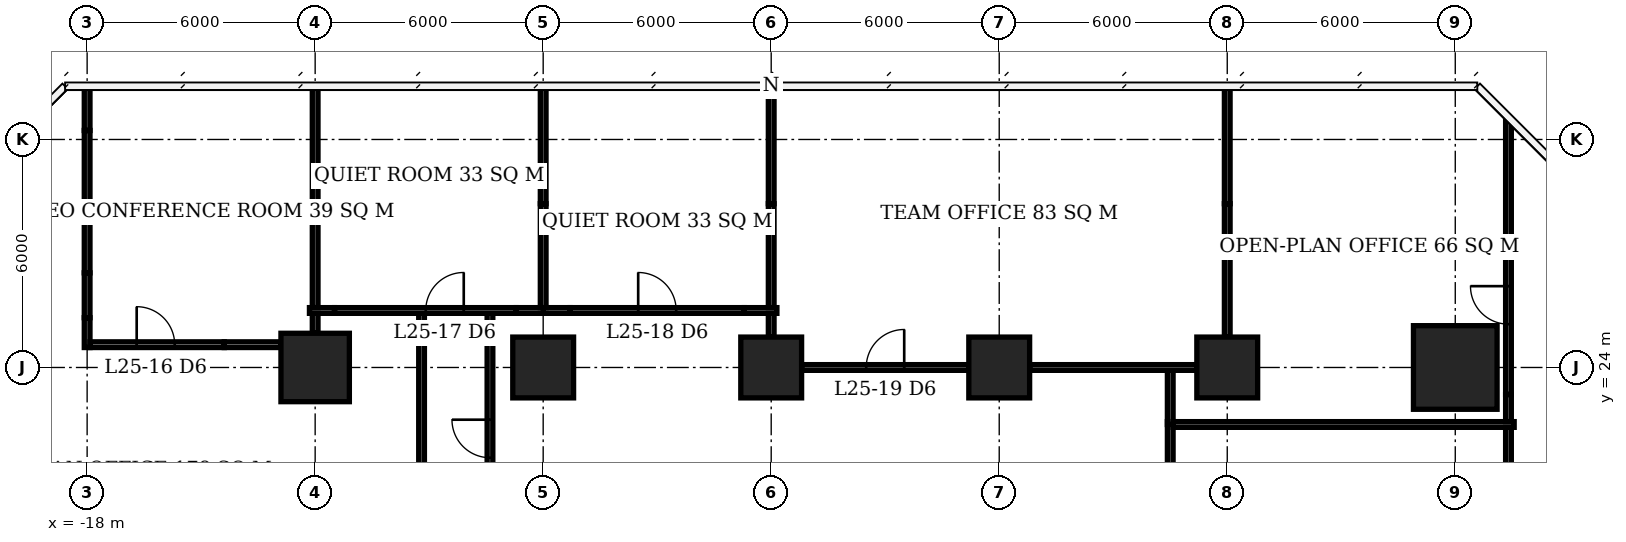
"""IFC4 building model, lengths in metres.
Left out: names, types, materials, properties, quantities, classifications, styles, units other than length and angle.
Written with IfcOpenShell. Run it as: python <this file> out.ifc"""

import sys

from ifc_helpers import new_model, si_unit, direction, frame, frame_2d, origin, origin_2d, place, context, subcontext, project, spatial, rectangle, extrude, element, fill, save


model = new_model("IFC4")
c1 = context("Model", 3, precision=1e-05, world=origin(), true_north=direction((0.0, 1.0)))
c2 = subcontext(c1, "Body", "Model", "MODEL_VIEW")
j1 = project(units=[si_unit("LENGTHUNIT", "METRE"), si_unit("PLANEANGLEUNIT", "RADIAN")], contexts=[c1])
p1 = place(None, origin())
s1 = spatial("IfcSite", under=j1, at=p1, CompositionType="ELEMENT")
p2 = place(p1, origin())
s2 = spatial("IfcBuilding", under=s1, at=p2, CompositionType="ELEMENT")
p3 = place(p2, frame((0.0, 0.0, 105.5)))
s3 = spatial("IfcBuildingStorey", under=s2, at=p3, CompositionType="ELEMENT", Elevation=105.5)
p4 = place(p3, frame((-12.0, 24.0, 0.0), z_axis=(0.0, 0.0, 1.0), x_axis=(1.0, 0.0, 0.0)))
e1 = element("IfcColumn", 1, at=p4, inside=s3, PredefinedType="COLUMN", context=c2, shape_type="SweptSolid", body=[
    extrude(rectangle(XDim=1.8, YDim=1.8, at=origin_2d()), origin(), (0.0, 0.0, 1.0), 3.9),
])
for number, where, z_axis, x_axis in (
    (2, (-6.0, 24.0, 0.0), (0.0, 0.0, 1.0), (1.0, 0.0, 0.0)),
    (3, (0.0, 24.0, 0.0), (0.0, 0.0, 1.0), (1.0, 0.0, 0.0)),
    (4, (6.0, 24.0, 0.0), (0.0, 0.0, 1.0), (1.0, 0.0, 0.0)),
    (5, (12.0, 24.0, 0.0), (0.0, 0.0, 1.0), (1.0, 0.0, 0.0)),
):
    element("IfcColumn", number, at=place(p3, frame(where, z_axis=z_axis, x_axis=x_axis)), inside=s3, PredefinedType="COLUMN", context=c2, shape_type="SweptSolid", body=[
        extrude(rectangle(XDim=1.6, YDim=1.6, at=origin_2d()), origin(), (0.0, 0.0, 1.0), 3.9),
    ])
p5 = place(p3, frame((18.0, 24.0, 0.0), z_axis=(0.0, 0.0, 1.0), x_axis=(1.0, 0.0, 0.0)))
e6 = element("IfcColumn", 6, at=p5, inside=s3, PredefinedType="COLUMN", context=c2, shape_type="SweptSolid", body=[
    extrude(rectangle(XDim=2.2, YDim=2.2, at=origin_2d()), origin(), (0.0, 0.0, 1.0), 3.9),
])
p6 = place(p3, frame((0.8, 24.0, 0.0), z_axis=(0.0, 0.0, 1.0), x_axis=(1.0, 0.0, 0.0)))
e7 = element("IfcWall", 7, at=p6, inside=s3, PredefinedType="PARTITIONING", context=c2, shape_type="SweptSolid", body=[
    extrude(rectangle(XDim=4.4, YDim=0.15, at=frame_2d((2.2, 0.0))), origin(), (0.0, 0.0, 1.0), 3.65),
])
p7 = place(p6, frame((1.7, 0.0, 0.0)))
e8 = element("IfcOpeningElement", 8, at=p7, cuts=e7, PredefinedType="OPENING", context=c2, shape_type="SweptSolid", body=[
    extrude(rectangle(XDim=1.0, YDim=2.1, at=frame_2d((0.5, 1.05))), frame((0.0, 0.085, 0.0), z_axis=(0.0, -1.0, 0.0), x_axis=(1.0, 0.0, 0.0)), (0.0, 0.0, 1.0), 0.17),
])
p8 = place(p3, frame((6.8, 24.0, 0.0), z_axis=(0.0, 0.0, 1.0), x_axis=(1.0, 0.0, 0.0)))
e9 = element("IfcWall", 9, at=p8, inside=s3, PredefinedType="PARTITIONING", context=c2, shape_type="SweptSolid", body=[
    extrude(rectangle(XDim=4.4, YDim=0.15, at=frame_2d((2.2, 0.0))), origin(), (0.0, 0.0, 1.0), 3.65),
])
p9 = place(p3, frame((-17.925, 24.6, 0.0), z_axis=(0.0, 0.0, 1.0), x_axis=(1.0, 0.0, 0.0)))
e10 = element("IfcWall", 10, at=p9, inside=s3, PredefinedType="PARTITIONING", context=c2, shape_type="SweptSolid", body=[
    extrude(rectangle(XDim=3.533, YDim=0.15, at=frame_2d((1.767, 0.0))), origin(), (0.0, 0.0, 1.0), 3.65),
])
p10 = place(p9, frame((1.229, 0.0, 0.0)))
e11 = element("IfcOpeningElement", 11, at=p10, cuts=e10, PredefinedType="OPENING", context=c2, shape_type="SweptSolid", body=[
    extrude(rectangle(XDim=1.0, YDim=2.1, at=frame_2d((0.5, 1.05))), frame((0.0, 0.085, 0.0), z_axis=(0.0, -1.0, 0.0), x_axis=(1.0, 0.0, 0.0)), (0.0, 0.0, 1.0), 0.17),
])
p11 = place(p3, frame((-14.392, 24.6, 0.0), z_axis=(0.0, 0.0, 1.0), x_axis=(1.0, 0.0, 0.0)))
e12 = element("IfcWall", 12, at=p11, inside=s3, PredefinedType="PARTITIONING", context=c2, shape_type="SweptSolid", body=[
    extrude(rectangle(XDim=1.492, YDim=0.15, at=frame_2d((0.746, 0.0))), origin(), (0.0, 0.0, 1.0), 2.65),
])
p12 = place(p3, frame((-12.15, 25.5, 0.0), z_axis=(0.0, 0.0, 1.0), x_axis=(1.0, 0.0, 0.0)))
e13 = element("IfcWall", 13, at=p12, inside=s3, PredefinedType="PARTITIONING", context=c2, shape_type="SweptSolid", body=[
    extrude(rectangle(XDim=0.66, YDim=0.15, at=frame_2d((0.33, 0.0))), origin(), (0.0, 0.0, 1.0), 2.65),
])
p13 = place(p3, frame((-11.49, 25.5, 0.0), z_axis=(0.0, 0.0, 1.0), x_axis=(1.0, 0.0, 0.0)))
e14 = element("IfcWall", 14, at=p13, inside=s3, PredefinedType="PARTITIONING", context=c2, shape_type="SweptSolid", body=[
    extrude(rectangle(XDim=4.78, YDim=0.15, at=frame_2d((2.39, 0.0))), origin(), (0.0, 0.0, 1.0), 3.65),
])
p14 = place(p13, frame((2.4, 0.0, 0.0)))
e15 = element("IfcOpeningElement", 15, at=p14, cuts=e14, PredefinedType="OPENING", context=c2, shape_type="SweptSolid", body=[
    extrude(rectangle(XDim=1.0, YDim=2.1, at=frame_2d((0.5, 1.05))), frame((0.0, 0.085, 0.0), z_axis=(0.0, -1.0, 0.0), x_axis=(1.0, 0.0, 0.0)), (0.0, 0.0, 1.0), 0.17),
])
p15 = place(p3, frame((-6.71, 25.5, 0.0), z_axis=(0.0, 0.0, 1.0), x_axis=(1.0, 0.0, 0.0)))
e16 = element("IfcWall", 16, at=p15, inside=s3, PredefinedType="PARTITIONING", context=c2, shape_type="SweptSolid", body=[
    extrude(rectangle(XDim=0.785, YDim=0.15, at=frame_2d((0.393, 0.0))), origin(), (0.0, 0.0, 1.0), 2.65),
])
p16 = place(p3, frame((-6.0, 25.5, 0.0), z_axis=(0.0, 0.0, 1.0), x_axis=(1.0, 0.0, 0.0)))
e17 = element("IfcWall", 17, at=p16, inside=s3, PredefinedType="PARTITIONING", context=c2, shape_type="SweptSolid", body=[
    extrude(rectangle(XDim=0.71, YDim=0.15, at=frame_2d((0.355, 0.0))), origin(), (0.0, 0.0, 1.0), 2.65),
])
p17 = place(p3, frame((-5.29, 25.5, 0.0), z_axis=(0.0, 0.0, 1.0), x_axis=(1.0, 0.0, 0.0)))
e18 = element("IfcWall", 18, at=p17, inside=s3, PredefinedType="PARTITIONING", context=c2, shape_type="SweptSolid", body=[
    extrude(rectangle(XDim=4.58, YDim=0.15, at=frame_2d((2.29, 0.0))), origin(), (0.0, 0.0, 1.0), 3.65),
])
p18 = place(p17, frame((1.79, 0.0, 0.0)))
e19 = element("IfcOpeningElement", 19, at=p18, cuts=e18, PredefinedType="OPENING", context=c2, shape_type="SweptSolid", body=[
    extrude(rectangle(XDim=1.0, YDim=2.1, at=frame_2d((0.5, 1.05))), frame((0.0, 0.085, 0.0), z_axis=(0.0, -1.0, 0.0), x_axis=(1.0, 0.0, 0.0)), (0.0, 0.0, 1.0), 0.17),
])
p19 = place(p3, frame((-0.71, 25.5, 0.0), z_axis=(0.0, 0.0, 1.0), x_axis=(1.0, 0.0, 0.0)))
e20 = element("IfcWall", 20, at=p19, inside=s3, PredefinedType="PARTITIONING", context=c2, shape_type="SweptSolid", body=[
    extrude(rectangle(XDim=0.86, YDim=0.15, at=frame_2d((0.43, 0.0))), origin(), (0.0, 0.0, 1.0), 2.65),
])
p20 = place(p3, frame((-18.0, 24.525, 0.0), z_axis=(0.0, 0.0, 1.0), x_axis=(0.0, 1.0, 0.0)))
e21 = element("IfcWall", 21, at=p20, inside=s3, PredefinedType="PARTITIONING", context=c2, shape_type="SweptSolid", body=[
    extrude(rectangle(XDim=0.785, YDim=0.15, at=frame_2d((0.393, 0.0))), origin(), (0.0, 0.0, 1.0), 3.65),
])
p21 = place(p3, frame((-18.0, 25.31, 0.0), z_axis=(0.0, 0.0, 1.0), x_axis=(0.0, 1.0, 0.0)))
e22 = element("IfcWall", 22, at=p21, inside=s3, PredefinedType="PARTITIONING", context=c2, shape_type="SweptSolid", body=[
    extrude(rectangle(XDim=1.18, YDim=0.15, at=frame_2d((0.59, 0.0))), origin(), (0.0, 0.0, 1.0), 2.65),
])
p22 = place(p3, frame((-18.0, 26.49, 0.0), z_axis=(0.0, 0.0, 1.0), x_axis=(0.0, 1.0, 0.0)))
e23 = element("IfcWall", 23, at=p22, inside=s3, PredefinedType="PARTITIONING", context=c2, shape_type="SweptSolid", body=[
    extrude(rectangle(XDim=1.718, YDim=0.15, at=frame_2d((0.859, 0.0))), origin(), (0.0, 0.0, 1.0), 3.65),
])
p23 = place(p3, frame((-18.0, 28.208, 0.0), z_axis=(0.0, 0.0, 1.0), x_axis=(0.0, 1.0, 0.0)))
e24 = element("IfcWall", 24, at=p23, inside=s3, PredefinedType="PARTITIONING", context=c2, shape_type="SweptSolid", body=[
    extrude(rectangle(XDim=2.029, YDim=0.15, at=frame_2d((1.015, 0.0))), origin(), (0.0, 0.0, 1.0), 2.65),
])
p24 = place(p3, frame((-18.0, 30.237, 0.0), z_axis=(0.0, 0.0, 1.0), x_axis=(0.0, 1.0, 0.0)))
e25 = element("IfcWall", 25, at=p24, inside=s3, PredefinedType="PARTITIONING", context=c2, shape_type="SweptSolid", body=[
    extrude(rectangle(XDim=1.163, YDim=0.15, at=frame_2d((0.582, 0.0))), origin(), (0.0, 0.0, 1.0), 3.65),
])
p25 = place(p3, frame((-12.0, 24.9, 0.0), z_axis=(0.0, 0.0, 1.0), x_axis=(0.0, 1.0, 0.0)))
e26 = element("IfcWall", 26, at=p25, inside=s3, PredefinedType="PARTITIONING", context=c2, shape_type="SweptSolid", body=[
    extrude(rectangle(XDim=0.525, YDim=0.15, at=frame_2d((0.263, 0.0))), origin(), (0.0, 0.0, 1.0), 2.65),
])
p26 = place(p3, frame((-12.0, 25.575, 0.0), z_axis=(0.0, 0.0, 1.0), x_axis=(0.0, 1.0, 0.0)))
e27 = element("IfcWall", 27, at=p26, inside=s3, PredefinedType="PARTITIONING", context=c2, shape_type="SweptSolid", body=[
    extrude(rectangle(XDim=2.735, YDim=0.15, at=frame_2d((1.368, 0.0))), origin(), (0.0, 0.0, 1.0), 2.65),
])
p27 = place(p3, frame((-12.0, 28.31, 0.0), z_axis=(0.0, 0.0, 1.0), x_axis=(0.0, 1.0, 0.0)))
e28 = element("IfcWall", 28, at=p27, inside=s3, PredefinedType="PARTITIONING", context=c2, shape_type="SweptSolid", body=[
    extrude(rectangle(XDim=3.09, YDim=0.15, at=frame_2d((1.545, 0.0))), origin(), (0.0, 0.0, 1.0), 3.65),
])
p28 = place(p3, frame((-6.0, 25.575, 0.0), z_axis=(0.0, 0.0, 1.0), x_axis=(0.0, 1.0, 0.0)))
e29 = element("IfcWall", 29, at=p28, inside=s3, PredefinedType="PARTITIONING", context=c2, shape_type="SweptSolid", body=[
    extrude(rectangle(XDim=2.735, YDim=0.15, at=frame_2d((1.368, 0.0))), origin(), (0.0, 0.0, 1.0), 2.65),
])
p29 = place(p3, frame((-6.0, 28.31, 0.0), z_axis=(0.0, 0.0, 1.0), x_axis=(0.0, 1.0, 0.0)))
e30 = element("IfcWall", 30, at=p29, inside=s3, PredefinedType="PARTITIONING", context=c2, shape_type="SweptSolid", body=[
    extrude(rectangle(XDim=3.09, YDim=0.15, at=frame_2d((1.545, 0.0))), origin(), (0.0, 0.0, 1.0), 3.65),
])
p30 = place(p3, frame((0.0, 24.8, 0.0), z_axis=(0.0, 0.0, 1.0), x_axis=(0.0, 1.0, 0.0)))
e31 = element("IfcWall", 31, at=p30, inside=s3, PredefinedType="PARTITIONING", context=c2, shape_type="SweptSolid", body=[
    extrude(rectangle(XDim=0.625, YDim=0.15, at=frame_2d((0.312, 0.0))), origin(), (0.0, 0.0, 1.0), 2.65),
])
p31 = place(p3, frame((0.0, 25.575, 0.0), z_axis=(0.0, 0.0, 1.0), x_axis=(0.0, 1.0, 0.0)))
e32 = element("IfcWall", 32, at=p31, inside=s3, PredefinedType="PARTITIONING", context=c2, shape_type="SweptSolid", body=[
    extrude(rectangle(XDim=2.735, YDim=0.15, at=frame_2d((1.368, 0.0))), origin(), (0.0, 0.0, 1.0), 2.65),
])
p32 = place(p3, frame((0.0, 28.31, 0.0), z_axis=(0.0, 0.0, 1.0), x_axis=(0.0, 1.0, 0.0)))
e33 = element("IfcWall", 33, at=p32, inside=s3, PredefinedType="PARTITIONING", context=c2, shape_type="SweptSolid", body=[
    extrude(rectangle(XDim=3.04, YDim=0.15, at=frame_2d((1.52, 0.0))), origin(), (0.0, 0.0, 1.0), 3.65),
])
p33 = place(p3, frame((12.0, 24.8, 0.0), z_axis=(0.0, 0.0, 1.0), x_axis=(0.0, 1.0, 0.0)))
e34 = element("IfcWall", 34, at=p33, inside=s3, PredefinedType="PARTITIONING", context=c2, shape_type="SweptSolid", body=[
    extrude(rectangle(XDim=3.51, YDim=0.15, at=frame_2d((1.755, 0.0))), origin(), (0.0, 0.0, 1.0), 2.65),
])
p34 = place(p3, frame((12.0, 28.31, 0.0), z_axis=(0.0, 0.0, 1.0), x_axis=(0.0, 1.0, 0.0)))
e35 = element("IfcWall", 35, at=p34, inside=s3, PredefinedType="PARTITIONING", context=c2, shape_type="SweptSolid", body=[
    extrude(rectangle(XDim=3.09, YDim=0.15, at=frame_2d((1.545, 0.0))), origin(), (0.0, 0.0, 1.0), 3.65),
])
p35 = place(p3, frame((-9.2, 13.575, 0.0), z_axis=(0.0, 0.0, 1.0), x_axis=(0.0, 1.0, 0.0)))
e36 = element("IfcWall", 36, at=p35, inside=s3, PredefinedType="PARTITIONING", context=c2, shape_type="SweptSolid", body=[
    extrude(rectangle(XDim=11.85, YDim=0.15, at=frame_2d((5.925, 0.0))), origin(), (0.0, 0.0, 1.0), 3.65),
])
p36 = place(p35, frame((3.599, 0.0, 0.0)))
e37 = element("IfcOpeningElement", 37, at=p36, cuts=e36, PredefinedType="OPENING", context=c2, shape_type="SweptSolid", body=[
    extrude(rectangle(XDim=1.0, YDim=2.1, at=frame_2d((0.5, 1.05))), frame((0.0, 0.085, 0.0), z_axis=(0.0, -1.0, 0.0), x_axis=(1.0, 0.0, 0.0)), (0.0, 0.0, 1.0), 0.17),
])
p37 = place(p3, frame((-7.4, 16.0, 0.0), z_axis=(0.0, 0.0, 1.0), x_axis=(0.0, 1.0, 0.0)))
e38 = element("IfcWall", 38, at=p37, inside=s3, PredefinedType="PARTITIONING", context=c2, shape_type="SweptSolid", body=[
    extrude(rectangle(XDim=9.425, YDim=0.15, at=frame_2d((4.712, 0.0))), origin(), (0.0, 0.0, 1.0), 3.65),
])
p38 = place(p37, frame((5.626, 0.0, 0.0)))
e39 = element("IfcOpeningElement", 39, at=p38, cuts=e38, PredefinedType="OPENING", context=c2, shape_type="SweptSolid", body=[
    extrude(rectangle(XDim=1.0, YDim=2.1, at=frame_2d((0.5, 1.05))), frame((0.0, 0.085, 0.0), z_axis=(0.0, -1.0, 0.0), x_axis=(1.0, 0.0, 0.0)), (0.0, 0.0, 1.0), 0.17),
])
p39 = place(p3, frame((10.5, 13.6, 0.0), z_axis=(0.0, 0.0, 1.0), x_axis=(0.0, 1.0, 0.0)))
e40 = element("IfcWall", 40, at=p39, inside=s3, PredefinedType="PARTITIONING", context=c2, shape_type="SweptSolid", body=[
    extrude(rectangle(XDim=8.975, YDim=0.15, at=frame_2d((4.487, 0.0))), origin(), (0.0, 0.0, 1.0), 3.65),
])
p40 = place(p3, frame((10.5, 22.5, 0.0), z_axis=(0.0, 0.0, 1.0), x_axis=(0.0, 1.0, 0.0)))
e41 = element("IfcWall", 41, at=p40, inside=s3, PredefinedType="PARTITIONING", context=c2, shape_type="SweptSolid", body=[
    extrude(rectangle(XDim=1.425, YDim=0.15, at=frame_2d((0.712, 0.0))), origin(), (0.0, 0.0, 1.0), 3.65),
])
p41 = place(p3, frame((10.575, 22.5, 0.0), z_axis=(0.0, 0.0, 1.0), x_axis=(1.0, 0.0, 0.0)))
e42 = element("IfcWall", 42, at=p41, inside=s3, PredefinedType="PARTITIONING", context=c2, shape_type="SweptSolid", body=[
    extrude(rectangle(XDim=8.975, YDim=0.15, at=frame_2d((4.488, 0.0))), origin(), (0.0, 0.0, 1.0), 3.65),
])
p42 = place(p3, frame((19.4, 16.0, 0.0), z_axis=(0.0, 0.0, 1.0), x_axis=(0.0, 1.0, 0.0)))
e43 = element("IfcWall", 43, at=p42, inside=s3, PredefinedType="PARTITIONING", context=c2, shape_type="SweptSolid", body=[
    extrude(rectangle(XDim=6.425, YDim=0.15, at=frame_2d((3.212, 0.0))), origin(), (0.0, 0.0, 1.0), 3.65),
])
p43 = place(p42, frame((2.85, 0.0, 0.0)))
e44 = element("IfcOpeningElement", 44, at=p43, cuts=e43, PredefinedType="OPENING", context=c2, shape_type="SweptSolid", body=[
    extrude(rectangle(XDim=1.0, YDim=2.1, at=frame_2d((0.5, 1.05))), frame((0.0, 0.085, 0.0), z_axis=(0.0, -1.0, 0.0), x_axis=(1.0, 0.0, 0.0)), (0.0, 0.0, 1.0), 0.17),
])
p44 = place(p3, frame((19.4, 22.575, 0.0), z_axis=(0.0, 0.0, 1.0), x_axis=(0.0, 1.0, 0.0)))
e45 = element("IfcWall", 45, at=p44, inside=s3, PredefinedType="PARTITIONING", context=c2, shape_type="SweptSolid", body=[
    extrude(rectangle(XDim=0.715, YDim=0.15, at=frame_2d((0.357, 0.0))), origin(), (0.0, 0.0, 1.0), 3.65),
])
p45 = place(p3, frame((19.4, 23.29, 0.0), z_axis=(0.0, 0.0, 1.0), x_axis=(0.0, 1.0, 0.0)))
e46 = element("IfcWall", 46, at=p45, inside=s3, PredefinedType="PARTITIONING", context=c2, shape_type="SweptSolid", body=[
    extrude(rectangle(XDim=3.85, YDim=0.15, at=frame_2d((1.925, 0.0))), origin(), (0.0, 0.0, 1.0), 2.65),
])
p46 = place(p45, frame((1.85, 0.0, 0.0)))
e47 = element("IfcOpeningElement", 47, at=p46, cuts=e46, PredefinedType="OPENING", context=c2, shape_type="SweptSolid", body=[
    extrude(rectangle(XDim=1.0, YDim=2.1, at=frame_2d((0.5, 1.05))), frame((0.0, 0.085, 0.0), z_axis=(0.0, -1.0, 0.0), x_axis=(1.0, 0.0, 0.0)), (0.0, 0.0, 1.0), 0.17),
])
p47 = place(p3, frame((19.4, 27.14, 0.0), z_axis=(0.0, 0.0, 1.0), x_axis=(0.0, 1.0, 0.0)))
e48 = element("IfcWall", 48, at=p47, inside=s3, PredefinedType="PARTITIONING", context=c2, shape_type="SweptSolid", body=[
    extrude(rectangle(XDim=3.349, YDim=0.15, at=frame_2d((1.675, 0.0))), origin(), (0.0, 0.0, 1.0), 3.65),
])
p48 = place(p10, origin())
e49 = element("IfcDoor", 49, at=p48, inside=s3, OperationType="SINGLE_SWING_LEFT", PredefinedType="DOOR", context=c2, shape_type="SweptSolid", body=[
    extrude(rectangle(XDim=1.0, YDim=2.1, at=frame_2d((0.5, 1.05))), frame((0.0, 0.025, 0.0), z_axis=(0.0, -1.0, 0.0), x_axis=(1.0, 0.0, 0.0)), (0.0, 0.0, 1.0), 0.05),
])
fill(e11, e49)
p49 = place(p14, origin())
e50 = element("IfcDoor", 50, at=p49, inside=s3, OperationType="SINGLE_SWING_RIGHT", PredefinedType="DOOR", context=c2, shape_type="SweptSolid", body=[
    extrude(rectangle(XDim=1.0, YDim=2.1, at=frame_2d((0.5, 1.05))), frame((0.0, 0.025, 0.0), z_axis=(0.0, -1.0, 0.0), x_axis=(1.0, 0.0, 0.0)), (0.0, 0.0, 1.0), 0.05),
])
fill(e15, e50)
p50 = place(p18, origin())
e51 = element("IfcDoor", 51, at=p50, inside=s3, OperationType="SINGLE_SWING_LEFT", PredefinedType="DOOR", context=c2, shape_type="SweptSolid", body=[
    extrude(rectangle(XDim=1.0, YDim=2.1, at=frame_2d((0.5, 1.05))), frame((0.0, 0.025, 0.0), z_axis=(0.0, -1.0, 0.0), x_axis=(1.0, 0.0, 0.0)), (0.0, 0.0, 1.0), 0.05),
])
fill(e19, e51)
p51 = place(p7, origin())
e52 = element("IfcDoor", 52, at=p51, inside=s3, OperationType="SINGLE_SWING_RIGHT", PredefinedType="DOOR", context=c2, shape_type="SweptSolid", body=[
    extrude(rectangle(XDim=1.0, YDim=2.1, at=frame_2d((0.5, 1.05))), frame((0.0, 0.025, 0.0), z_axis=(0.0, -1.0, 0.0), x_axis=(1.0, 0.0, 0.0)), (0.0, 0.0, 1.0), 0.05),
])
fill(e8, e52)
p52 = place(p38, origin())
e53 = element("IfcDoor", 53, at=p52, inside=s3, OperationType="SINGLE_SWING_RIGHT", PredefinedType="DOOR", context=c2, shape_type="SweptSolid", body=[
    extrude(rectangle(XDim=1.0, YDim=2.1, at=frame_2d((0.5, 1.05))), frame((0.0, 0.025, 0.0), z_axis=(0.0, -1.0, 0.0), x_axis=(1.0, 0.0, 0.0)), (0.0, 0.0, 1.0), 0.05),
])
fill(e39, e53)
p53 = place(p46, origin())
e54 = element("IfcDoor", 54, at=p53, inside=s3, OperationType="SINGLE_SWING_RIGHT", PredefinedType="DOOR", context=c2, shape_type="SweptSolid", body=[
    extrude(rectangle(XDim=1.0, YDim=2.1, at=frame_2d((0.5, 1.05))), frame((0.0, 0.025, 0.0), z_axis=(0.0, -1.0, 0.0), x_axis=(1.0, 0.0, 0.0)), (0.0, 0.0, 1.0), 0.05),
])
fill(e47, e54)
save(model, sys.argv[1])
